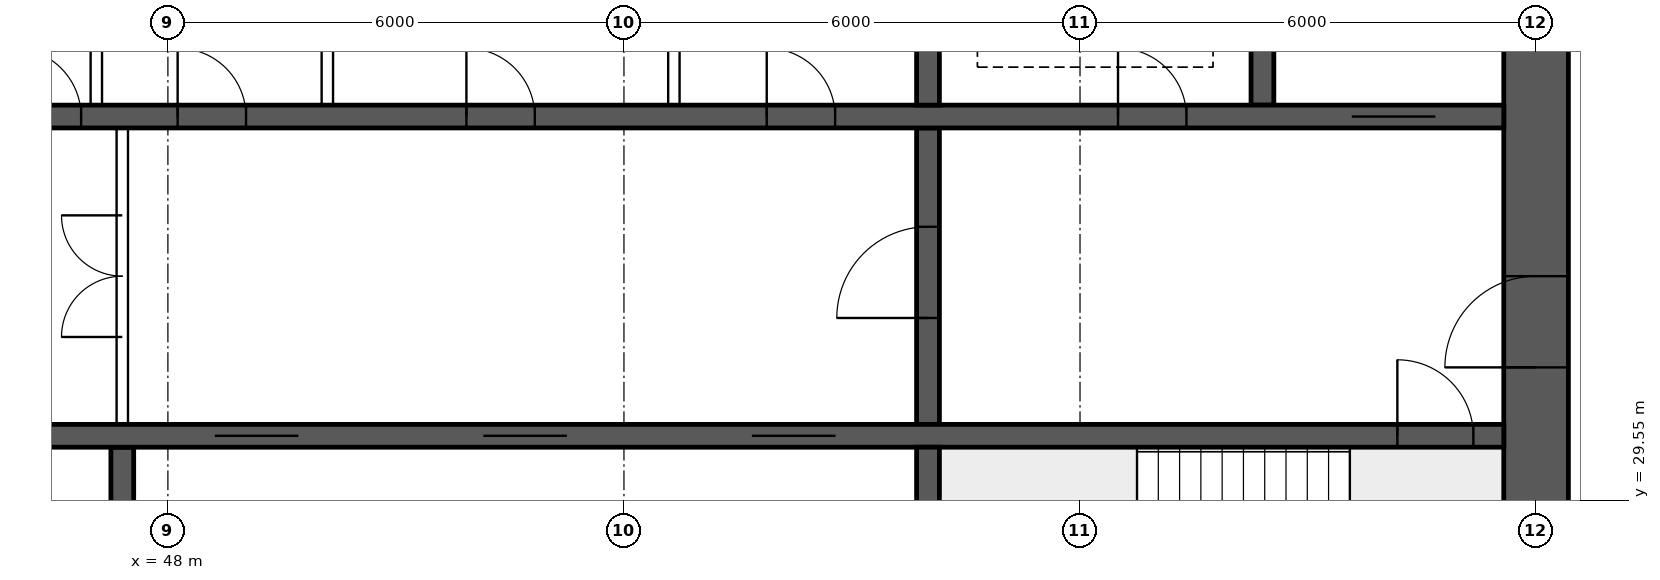
"""IFC4 building model, lengths in metres.
Left out: names, types, materials, properties, quantities, classifications, styles, units other than length and angle.
Written with IfcOpenShell. Run it as: python <this file> out.ifc"""

import sys

from ifc_helpers import new_model, si_unit, direction, frame, frame_2d, origin, place, context, subcontext, project, spatial, rectangle, extrude, element, fill, save


model = new_model("IFC4")
c1 = context("Model", 3, precision=1e-05, world=origin(), true_north=direction((0.0, 1.0)))
c2 = subcontext(c1, "Body", "Model", "MODEL_VIEW")
j1 = project(units=[si_unit("LENGTHUNIT", "METRE"), si_unit("PLANEANGLEUNIT", "RADIAN")], contexts=[c1])
p1 = place(None, origin())
s1 = spatial("IfcSite", under=j1, at=p1, CompositionType="ELEMENT")
p2 = place(p1, origin())
s2 = spatial("IfcBuilding", under=s1, at=p2, CompositionType="ELEMENT")
p3 = place(p2, frame((0.0, 0.0, 197.35)))
s3 = spatial("IfcBuildingStorey", under=s2, at=p3, CompositionType="ELEMENT", Elevation=197.35)
p4 = place(p3, frame((66.0, 26.225, 0.0), z_axis=(0.0, 0.0, 1.0), x_axis=(0.0, 1.0, 0.0)))
e1 = element("IfcWall", 1, at=p4, inside=s3, PredefinedType="SHEAR", context=c2, shape_type="SweptSolid", body=[
    extrude(rectangle(XDim=11.55, YDim=0.85, at=frame_2d((5.775, 0.0))), origin(), (0.0, 0.0, 1.0), 3.75),
])
p5 = place(p4, frame((5.075, 0.0, 0.0)))
e2 = element("IfcOpeningElement", 2, at=p5, cuts=e1, PredefinedType="OPENING", context=c2, shape_type="SweptSolid", body=[
    extrude(rectangle(XDim=1.2, YDim=2.1, at=frame_2d((0.6, 1.05))), frame((0.0, 0.435, 0.0), z_axis=(0.0, -1.0, 0.0), x_axis=(1.0, 0.0, 0.0)), (0.0, 0.0, 1.0), 0.87),
])
p6 = place(p3, frame((18.425, 30.4, 0.0), z_axis=(0.0, 0.0, 1.0), x_axis=(1.0, 0.0, 0.0)))
e3 = element("IfcWall", 3, at=p6, inside=s3, PredefinedType="SHEAR", context=c2, shape_type="SweptSolid", body=[
    extrude(rectangle(XDim=47.15, YDim=0.3, at=frame_2d((23.575, 0.0))), origin(), (0.0, 0.0, 1.0), 3.75),
])
p7 = place(p6, frame((0.4, 0.0, 0.0)))
e4 = element("IfcOpeningElement", 4, at=p7, cuts=e3, PredefinedType="OPENING", context=c2, shape_type="SweptSolid", body=[
    extrude(rectangle(XDim=1.0, YDim=2.1, at=frame_2d((0.5, 1.05))), frame((0.0, 0.16, 0.0), z_axis=(0.0, -1.0, 0.0), x_axis=(1.0, 0.0, 0.0)), (0.0, 0.0, 1.0), 0.32),
])
p8 = place(p6, frame((45.75, 0.0, 0.0)))
e5 = element("IfcOpeningElement", 5, at=p8, cuts=e3, PredefinedType="OPENING", context=c2, shape_type="SweptSolid", body=[
    extrude(rectangle(XDim=1.0, YDim=2.1, at=frame_2d((0.5, 1.05))), frame((0.0, 0.16, 0.0), z_axis=(0.0, -1.0, 0.0), x_axis=(1.0, 0.0, 0.0)), (0.0, 0.0, 1.0), 0.32),
])
p9 = place(p6, frame((8.325, 0.0, 0.0)))
e6 = element("IfcOpeningElement", 6, at=p9, cuts=e3, PredefinedType="OPENING", context=c2, shape_type="SweptSolid", body=[
    extrude(rectangle(XDim=1.1, YDim=2.1, at=frame_2d((0.55, 1.05))), frame((0.0, 0.16, 0.0), z_axis=(0.0, -1.0, 0.0), x_axis=(1.0, 0.0, 0.0)), (0.0, 0.0, 1.0), 0.32),
])
p10 = place(p6, frame((10.925, 0.0, 0.0)))
e7 = element("IfcOpeningElement", 7, at=p10, cuts=e3, PredefinedType="OPENING", context=c2, shape_type="SweptSolid", body=[
    extrude(rectangle(XDim=1.1, YDim=2.1, at=frame_2d((0.55, 1.05))), frame((0.0, 0.16, 0.0), z_axis=(0.0, -1.0, 0.0), x_axis=(1.0, 0.0, 0.0)), (0.0, 0.0, 1.0), 0.32),
])
p11 = place(p6, frame((13.525, 0.0, 0.0)))
e8 = element("IfcOpeningElement", 8, at=p11, cuts=e3, PredefinedType="OPENING", context=c2, shape_type="SweptSolid", body=[
    extrude(rectangle(XDim=1.1, YDim=2.1, at=frame_2d((0.55, 1.05))), frame((0.0, 0.16, 0.0), z_axis=(0.0, -1.0, 0.0), x_axis=(1.0, 0.0, 0.0)), (0.0, 0.0, 1.0), 0.32),
])
p12 = place(p6, frame((16.125, 0.0, 0.0)))
e9 = element("IfcOpeningElement", 9, at=p12, cuts=e3, PredefinedType="OPENING", context=c2, shape_type="SweptSolid", body=[
    extrude(rectangle(XDim=1.1, YDim=2.1, at=frame_2d((0.55, 1.05))), frame((0.0, 0.16, 0.0), z_axis=(0.0, -1.0, 0.0), x_axis=(1.0, 0.0, 0.0)), (0.0, 0.0, 1.0), 0.32),
])
p13 = place(p6, frame((18.9, 0.0, 0.0)))
e10 = element("IfcOpeningElement", 10, at=p13, cuts=e3, PredefinedType="OPENING", context=c2, shape_type="SweptSolid", body=[
    extrude(rectangle(XDim=0.9, YDim=2.1, at=frame_2d((0.45, 1.05))), frame((0.0, 0.16, 0.0), z_axis=(0.0, -1.0, 0.0), x_axis=(1.0, 0.0, 0.0)), (0.0, 0.0, 1.0), 0.32),
])
p14 = place(p6, frame((30.192, 0.0, 0.0)))
e11 = element("IfcOpeningElement", 11, at=p14, cuts=e3, PredefinedType="OPENING", context=c2, shape_type="SweptSolid", body=[
    extrude(rectangle(XDim=1.1, YDim=2.1, at=frame_2d((0.55, 1.05))), frame((0.0, 0.16, 0.0), z_axis=(0.0, -1.0, 0.0), x_axis=(1.0, 0.0, 0.0)), (0.0, 0.0, 1.0), 0.32),
])
p15 = place(p6, frame((33.725, 0.0, 0.0)))
e12 = element("IfcOpeningElement", 12, at=p15, cuts=e3, PredefinedType="OPENING", context=c2, shape_type="SweptSolid", body=[
    extrude(rectangle(XDim=1.1, YDim=2.1, at=frame_2d((0.55, 1.05))), frame((0.0, 0.16, 0.0), z_axis=(0.0, -1.0, 0.0), x_axis=(1.0, 0.0, 0.0)), (0.0, 0.0, 1.0), 0.32),
])
p16 = place(p6, frame((37.258, 0.0, 0.0)))
e13 = element("IfcOpeningElement", 13, at=p16, cuts=e3, PredefinedType="OPENING", context=c2, shape_type="SweptSolid", body=[
    extrude(rectangle(XDim=1.1, YDim=2.1, at=frame_2d((0.55, 1.05))), frame((0.0, 0.16, 0.0), z_axis=(0.0, -1.0, 0.0), x_axis=(1.0, 0.0, 0.0)), (0.0, 0.0, 1.0), 0.32),
])
p17 = place(p3, frame((18.425, 34.6, 0.0), z_axis=(0.0, 0.0, 1.0), x_axis=(1.0, 0.0, 0.0)))
e14 = element("IfcWall", 14, at=p17, inside=s3, PredefinedType="SHEAR", context=c2, shape_type="SweptSolid", body=[
    extrude(rectangle(XDim=47.15, YDim=0.3, at=frame_2d((23.575, 0.0))), origin(), (0.0, 0.0, 1.0), 3.75),
])
p18 = place(p17, frame((0.9, 0.0, 0.0)))
e15 = element("IfcOpeningElement", 15, at=p18, cuts=e14, PredefinedType="OPENING", context=c2, shape_type="SweptSolid", body=[
    extrude(rectangle(XDim=1.1, YDim=2.1, at=frame_2d((0.55, 1.05))), frame((0.0, 0.16, 0.0), z_axis=(0.0, -1.0, 0.0), x_axis=(1.0, 0.0, 0.0)), (0.0, 0.0, 1.0), 0.32),
])
p19 = place(p17, frame((45.15, 0.0, 0.0)))
e16 = element("IfcOpeningElement", 16, at=p19, cuts=e14, PredefinedType="OPENING", context=c2, shape_type="SweptSolid", body=[
    extrude(rectangle(XDim=1.1, YDim=2.1, at=frame_2d((0.55, 1.05))), frame((0.0, 0.16, 0.0), z_axis=(0.0, -1.0, 0.0), x_axis=(1.0, 0.0, 0.0)), (0.0, 0.0, 1.0), 0.32),
])
p20 = place(p17, frame((4.175, 0.0, 0.0)))
e17 = element("IfcOpeningElement", 17, at=p20, cuts=e14, PredefinedType="OPENING", context=c2, shape_type="SweptSolid", body=[
    extrude(rectangle(XDim=0.9, YDim=2.1, at=frame_2d((0.45, 1.05))), frame((0.0, 0.16, 0.0), z_axis=(0.0, -1.0, 0.0), x_axis=(1.0, 0.0, 0.0)), (0.0, 0.0, 1.0), 0.32),
])
p21 = place(p17, frame((42.075, 0.0, 0.0)))
e18 = element("IfcOpeningElement", 18, at=p21, cuts=e14, PredefinedType="OPENING", context=c2, shape_type="SweptSolid", body=[
    extrude(rectangle(XDim=0.9, YDim=2.1, at=frame_2d((0.45, 1.05))), frame((0.0, 0.16, 0.0), z_axis=(0.0, -1.0, 0.0), x_axis=(1.0, 0.0, 0.0)), (0.0, 0.0, 1.0), 0.32),
])
p22 = place(p17, frame((8.95, 0.0, 0.0)))
e19 = element("IfcOpeningElement", 19, at=p22, cuts=e14, PredefinedType="OPENING", context=c2, shape_type="SweptSolid", body=[
    extrude(rectangle(XDim=0.9, YDim=2.1, at=frame_2d((0.45, 1.05))), frame((0.0, 0.16, 0.0), z_axis=(0.0, -1.0, 0.0), x_axis=(1.0, 0.0, 0.0)), (0.0, 0.0, 1.0), 0.32),
])
p23 = place(p17, frame((12.924, 0.0, 0.0)))
e20 = element("IfcOpeningElement", 20, at=p23, cuts=e14, PredefinedType="OPENING", context=c2, shape_type="SweptSolid", body=[
    extrude(rectangle(XDim=0.9, YDim=2.1, at=frame_2d((0.45, 1.05))), frame((0.0, 0.16, 0.0), z_axis=(0.0, -1.0, 0.0), x_axis=(1.0, 0.0, 0.0)), (0.0, 0.0, 1.0), 0.32),
])
p24 = place(p17, frame((16.571, 0.0, 0.0)))
e21 = element("IfcOpeningElement", 21, at=p24, cuts=e14, PredefinedType="OPENING", context=c2, shape_type="SweptSolid", body=[
    extrude(rectangle(XDim=0.9, YDim=2.1, at=frame_2d((0.45, 1.05))), frame((0.0, 0.16, 0.0), z_axis=(0.0, -1.0, 0.0), x_axis=(1.0, 0.0, 0.0)), (0.0, 0.0, 1.0), 0.32),
])
p25 = place(p17, frame((20.33, 0.0, 0.0)))
e22 = element("IfcOpeningElement", 22, at=p25, cuts=e14, PredefinedType="OPENING", context=c2, shape_type="SweptSolid", body=[
    extrude(rectangle(XDim=0.9, YDim=2.1, at=frame_2d((0.45, 1.05))), frame((0.0, 0.16, 0.0), z_axis=(0.0, -1.0, 0.0), x_axis=(1.0, 0.0, 0.0)), (0.0, 0.0, 1.0), 0.32),
])
p26 = place(p17, frame((24.736, 0.0, 0.0)))
e23 = element("IfcOpeningElement", 23, at=p26, cuts=e14, PredefinedType="OPENING", context=c2, shape_type="SweptSolid", body=[
    extrude(rectangle(XDim=0.9, YDim=2.1, at=frame_2d((0.45, 1.05))), frame((0.0, 0.16, 0.0), z_axis=(0.0, -1.0, 0.0), x_axis=(1.0, 0.0, 0.0)), (0.0, 0.0, 1.0), 0.32),
])
p27 = place(p17, frame((27.533, 0.0, 0.0)))
e24 = element("IfcOpeningElement", 24, at=p27, cuts=e14, PredefinedType="OPENING", context=c2, shape_type="SweptSolid", body=[
    extrude(rectangle(XDim=0.9, YDim=2.1, at=frame_2d((0.45, 1.05))), frame((0.0, 0.16, 0.0), z_axis=(0.0, -1.0, 0.0), x_axis=(1.0, 0.0, 0.0)), (0.0, 0.0, 1.0), 0.32),
])
p28 = place(p17, frame((29.703, 0.0, 0.0)))
e25 = element("IfcOpeningElement", 25, at=p28, cuts=e14, PredefinedType="OPENING", context=c2, shape_type="SweptSolid", body=[
    extrude(rectangle(XDim=0.9, YDim=2.1, at=frame_2d((0.45, 1.05))), frame((0.0, 0.16, 0.0), z_axis=(0.0, -1.0, 0.0), x_axis=(1.0, 0.0, 0.0)), (0.0, 0.0, 1.0), 0.32),
])
p29 = place(p17, frame((33.502, 0.0, 0.0)))
e26 = element("IfcOpeningElement", 26, at=p29, cuts=e14, PredefinedType="OPENING", context=c2, shape_type="SweptSolid", body=[
    extrude(rectangle(XDim=0.9, YDim=2.1, at=frame_2d((0.45, 1.05))), frame((0.0, 0.16, 0.0), z_axis=(0.0, -1.0, 0.0), x_axis=(1.0, 0.0, 0.0)), (0.0, 0.0, 1.0), 0.32),
])
p30 = place(p17, frame((37.453, 0.0, 0.0)))
e27 = element("IfcOpeningElement", 27, at=p30, cuts=e14, PredefinedType="OPENING", context=c2, shape_type="SweptSolid", body=[
    extrude(rectangle(XDim=0.9, YDim=2.1, at=frame_2d((0.45, 1.05))), frame((0.0, 0.16, 0.0), z_axis=(0.0, -1.0, 0.0), x_axis=(1.0, 0.0, 0.0)), (0.0, 0.0, 1.0), 0.32),
])
p31 = place(p3, frame((58.0, 26.225, 0.0), z_axis=(0.0, 0.0, 1.0), x_axis=(0.0, 1.0, 0.0)))
e28 = element("IfcWall", 28, at=p31, inside=s3, PredefinedType="SHEAR", context=c2, shape_type="SweptSolid", body=[
    extrude(rectangle(XDim=4.025, YDim=0.3, at=frame_2d((2.012, 0.0))), origin(), (0.0, 0.0, 1.0), 3.75),
])
p32 = place(p3, frame((58.0, 30.55, 0.0), z_axis=(0.0, 0.0, 1.0), x_axis=(0.0, 1.0, 0.0)))
e29 = element("IfcWall", 29, at=p32, inside=s3, PredefinedType="SHEAR", context=c2, shape_type="SweptSolid", body=[
    extrude(rectangle(XDim=3.9, YDim=0.3, at=frame_2d((1.95, 0.0))), origin(), (0.0, 0.0, 1.0), 3.75),
])
p33 = place(p32, frame((1.4, 0.0, 0.0)))
e30 = element("IfcOpeningElement", 30, at=p33, cuts=e29, PredefinedType="OPENING", context=c2, shape_type="SweptSolid", body=[
    extrude(rectangle(XDim=1.2, YDim=2.1, at=frame_2d((0.6, 1.05))), frame((0.0, 0.16, 0.0), z_axis=(0.0, -1.0, 0.0), x_axis=(1.0, 0.0, 0.0)), (0.0, 0.0, 1.0), 0.32),
])
for number, where, z_axis, x_axis in (
    (31, (62.4, 34.75, 0.0), (0.0, 0.0, 1.0), (0.0, 1.0, 0.0)),
    (32, (58.0, 34.75, 0.0), (0.0, 0.0, 1.0), (0.0, 1.0, 0.0)),
):
    element("IfcWall", number, at=place(p3, frame(where, z_axis=z_axis, x_axis=x_axis)), inside=s3, PredefinedType="SHEAR", context=c2, shape_type="SweptSolid", body=[
        extrude(rectangle(XDim=3.025, YDim=0.3, at=frame_2d((1.512, 0.0))), origin(), (0.0, 0.0, 1.0), 3.75),
    ])
p34 = place(p3, frame((47.4, 26.225, 0.0), z_axis=(0.0, 0.0, 1.0), x_axis=(0.0, 1.0, 0.0)))
e33 = element("IfcWall", 33, at=p34, inside=s3, PredefinedType="SHEAR", context=c2, shape_type="SweptSolid", body=[
    extrude(rectangle(XDim=4.025, YDim=0.3, at=frame_2d((2.012, 0.0))), origin(), (0.0, 0.0, 1.0), 3.75),
])
p35 = place(p3, frame((47.4, 30.55, 0.0), z_axis=(0.0, 0.0, 1.0), x_axis=(0.0, 1.0, 0.0)))
e34 = element("IfcWall", 34, at=p35, inside=s3, PredefinedType="SOLIDWALL", context=c2, shape_type="SweptSolid", body=[
    extrude(rectangle(XDim=3.9, YDim=0.15, at=frame_2d((1.95, 0.0))), origin(), (0.0, 0.0, 1.0), 3.4),
])
p36 = place(p35, frame((1.15, 0.0, 0.0)))
e35 = element("IfcOpeningElement", 35, at=p36, cuts=e34, PredefinedType="OPENING", context=c2, shape_type="SweptSolid", body=[
    extrude(rectangle(XDim=1.6, YDim=2.1, at=frame_2d((0.8, 1.05))), frame((0.0, 0.085, 0.0), z_axis=(0.0, -1.0, 0.0), x_axis=(1.0, 0.0, 0.0)), (0.0, 0.0, 1.0), 0.17),
])
for number, where, z_axis, x_axis in (
    (36, (47.058, 34.75, 0.0), (0.0, 0.0, 1.0), (0.0, 1.0, 0.0)),
    (37, (50.098, 34.75, 0.0), (0.0, 0.0, 1.0), (0.0, 1.0, 0.0)),
    (38, (54.657, 34.75, 0.0), (0.0, 0.0, 1.0), (0.0, 1.0, 0.0)),
):
    element("IfcWall", number, at=place(p3, frame(where, z_axis=z_axis, x_axis=x_axis)), inside=s3, PredefinedType="SOLIDWALL", context=c2, shape_type="SweptSolid", body=[
        extrude(rectangle(XDim=3.025, YDim=0.15, at=frame_2d((1.512, 0.0))), origin(), (0.0, 0.0, 1.0), 3.4),
    ])
p37 = place(p36, origin())
e39 = element("IfcDoor", 39, at=p37, inside=s3, OperationType="DOUBLE_DOOR_SINGLE_SWING", PredefinedType="DOOR", context=c2, shape_type="SweptSolid", body=[
    extrude(rectangle(XDim=1.6, YDim=2.1, at=frame_2d((0.8, 1.05))), frame((0.0, 0.025, 0.0), z_axis=(0.0, -1.0, 0.0), x_axis=(1.0, 0.0, 0.0)), (0.0, 0.0, 1.0), 0.05),
])
fill(e35, e39)
p38 = place(p5, origin())
e40 = element("IfcDoor", 40, at=p38, inside=s3, OperationType="SINGLE_SWING_LEFT", PredefinedType="DOOR", context=c2, shape_type="SweptSolid", body=[
    extrude(rectangle(XDim=1.2, YDim=2.1, at=frame_2d((0.6, 1.05))), frame((0.0, 0.025, 0.0), z_axis=(0.0, -1.0, 0.0), x_axis=(1.0, 0.0, 0.0)), (0.0, 0.0, 1.0), 0.05),
])
fill(e2, e40)
p39 = place(p8, origin())
e41 = element("IfcDoor", 41, at=p39, inside=s3, OperationType="SINGLE_SWING_LEFT", PredefinedType="DOOR", context=c2, shape_type="SweptSolid", body=[
    extrude(rectangle(XDim=1.0, YDim=2.1, at=frame_2d((0.5, 1.05))), frame((0.0, 0.025, 0.0), z_axis=(0.0, -1.0, 0.0), x_axis=(1.0, 0.0, 0.0)), (0.0, 0.0, 1.0), 0.05),
])
fill(e5, e41)
p40 = place(p19, origin())
e42 = element("IfcDoor", 42, at=p40, inside=s3, OperationType="DOUBLE_DOOR_SLIDING", PredefinedType="DOOR", context=c2, shape_type="SweptSolid", body=[
    extrude(rectangle(XDim=1.1, YDim=2.1, at=frame_2d((0.55, 1.05))), frame((0.0, 0.025, 0.0), z_axis=(0.0, -1.0, 0.0), x_axis=(1.0, 0.0, 0.0)), (0.0, 0.0, 1.0), 0.05),
])
fill(e16, e42)
p41 = place(p21, origin())
e43 = element("IfcDoor", 43, at=p41, inside=s3, OperationType="SINGLE_SWING_LEFT", PredefinedType="DOOR", context=c2, shape_type="SweptSolid", body=[
    extrude(rectangle(XDim=0.9, YDim=2.1, at=frame_2d((0.45, 1.05))), frame((0.0, 0.025, 0.0), z_axis=(0.0, -1.0, 0.0), x_axis=(1.0, 0.0, 0.0)), (0.0, 0.0, 1.0), 0.05),
])
fill(e18, e43)
p42 = place(p33, origin())
e44 = element("IfcDoor", 44, at=p42, inside=s3, OperationType="SINGLE_SWING_LEFT", PredefinedType="DOOR", context=c2, shape_type="SweptSolid", body=[
    extrude(rectangle(XDim=1.2, YDim=2.1, at=frame_2d((0.6, 1.05))), frame((0.0, 0.025, 0.0), z_axis=(0.0, -1.0, 0.0), x_axis=(1.0, 0.0, 0.0)), (0.0, 0.0, 1.0), 0.05),
])
fill(e30, e44)
p43 = place(p27, origin())
e45 = element("IfcDoor", 45, at=p43, inside=s3, OperationType="SINGLE_SWING_LEFT", PredefinedType="DOOR", context=c2, shape_type="SweptSolid", body=[
    extrude(rectangle(XDim=0.9, YDim=2.1, at=frame_2d((0.45, 1.05))), frame((0.0, 0.025, 0.0), z_axis=(0.0, -1.0, 0.0), x_axis=(1.0, 0.0, 0.0)), (0.0, 0.0, 1.0), 0.05),
])
fill(e24, e45)
p44 = place(p28, origin())
e46 = element("IfcDoor", 46, at=p44, inside=s3, OperationType="SINGLE_SWING_LEFT", PredefinedType="DOOR", context=c2, shape_type="SweptSolid", body=[
    extrude(rectangle(XDim=0.9, YDim=2.1, at=frame_2d((0.45, 1.05))), frame((0.0, 0.025, 0.0), z_axis=(0.0, -1.0, 0.0), x_axis=(1.0, 0.0, 0.0)), (0.0, 0.0, 1.0), 0.05),
])
fill(e25, e46)
p45 = place(p29, origin())
e47 = element("IfcDoor", 47, at=p45, inside=s3, OperationType="SINGLE_SWING_LEFT", PredefinedType="DOOR", context=c2, shape_type="SweptSolid", body=[
    extrude(rectangle(XDim=0.9, YDim=2.1, at=frame_2d((0.45, 1.05))), frame((0.0, 0.025, 0.0), z_axis=(0.0, -1.0, 0.0), x_axis=(1.0, 0.0, 0.0)), (0.0, 0.0, 1.0), 0.05),
])
fill(e26, e47)
p46 = place(p30, origin())
e48 = element("IfcDoor", 48, at=p46, inside=s3, OperationType="SINGLE_SWING_LEFT", PredefinedType="DOOR", context=c2, shape_type="SweptSolid", body=[
    extrude(rectangle(XDim=0.9, YDim=2.1, at=frame_2d((0.45, 1.05))), frame((0.0, 0.025, 0.0), z_axis=(0.0, -1.0, 0.0), x_axis=(1.0, 0.0, 0.0)), (0.0, 0.0, 1.0), 0.05),
])
fill(e27, e48)
p47 = place(p14, origin())
e49 = element("IfcDoor", 49, at=p47, inside=s3, OperationType="DOUBLE_DOOR_SLIDING", PredefinedType="DOOR", context=c2, shape_type="SweptSolid", body=[
    extrude(rectangle(XDim=1.1, YDim=2.1, at=frame_2d((0.55, 1.05))), frame((0.0, 0.025, 0.0), z_axis=(0.0, -1.0, 0.0), x_axis=(1.0, 0.0, 0.0)), (0.0, 0.0, 1.0), 0.05),
])
fill(e11, e49)
p48 = place(p15, origin())
e50 = element("IfcDoor", 50, at=p48, inside=s3, OperationType="DOUBLE_DOOR_SLIDING", PredefinedType="DOOR", context=c2, shape_type="SweptSolid", body=[
    extrude(rectangle(XDim=1.1, YDim=2.1, at=frame_2d((0.55, 1.05))), frame((0.0, 0.025, 0.0), z_axis=(0.0, -1.0, 0.0), x_axis=(1.0, 0.0, 0.0)), (0.0, 0.0, 1.0), 0.05),
])
fill(e12, e50)
p49 = place(p16, origin())
e51 = element("IfcDoor", 51, at=p49, inside=s3, OperationType="DOUBLE_DOOR_SLIDING", PredefinedType="DOOR", context=c2, shape_type="SweptSolid", body=[
    extrude(rectangle(XDim=1.1, YDim=2.1, at=frame_2d((0.55, 1.05))), frame((0.0, 0.025, 0.0), z_axis=(0.0, -1.0, 0.0), x_axis=(1.0, 0.0, 0.0)), (0.0, 0.0, 1.0), 0.05),
])
fill(e13, e51)
save(model, sys.argv[1])
